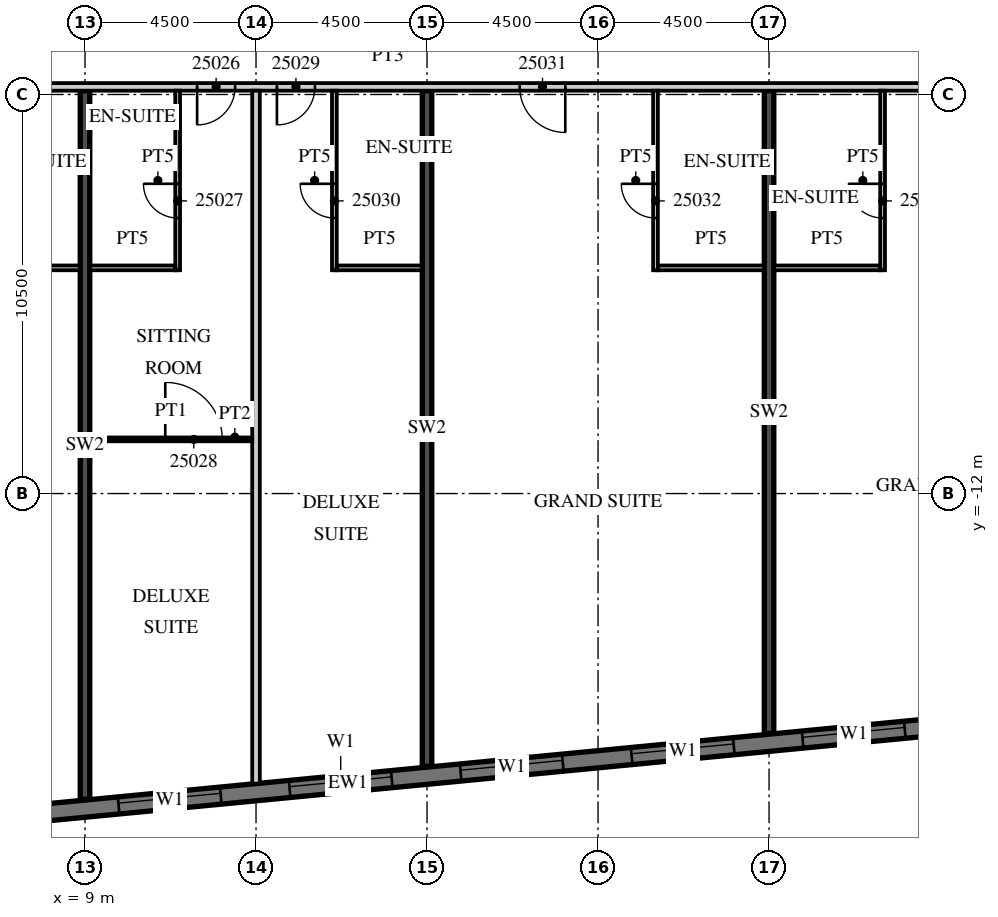
"""IFC4 building model, lengths in metres.
Left out: names, types, materials, properties, quantities, classifications, styles, units other than length and angle.
Written with IfcOpenShell. Run it as: python <this file> out.ifc"""

import sys

from ifc_helpers import new_model, si_unit, direction, frame, frame_2d, origin, place, context, subcontext, project, spatial, rectangle, extrude, element, fill, save


model = new_model("IFC4")
c1 = context("Model", 3, precision=1e-05, world=origin(), true_north=direction((0.0, 1.0)))
c2 = subcontext(c1, "Body", "Model", "MODEL_VIEW")
j1 = project(units=[si_unit("LENGTHUNIT", "METRE"), si_unit("PLANEANGLEUNIT", "RADIAN")], contexts=[c1])
p1 = place(None, origin())
s1 = spatial("IfcSite", under=j1, at=p1, CompositionType="ELEMENT")
p2 = place(p1, origin())
s2 = spatial("IfcBuilding", under=s1, at=p2, CompositionType="ELEMENT")
p3 = place(p2, frame((0.0, 0.0, 117.4)))
s3 = spatial("IfcBuildingStorey", under=s2, at=p3, CompositionType="ELEMENT", Elevation=117.4)
p4 = place(p3, frame((9.0, -20.044, 0.0), z_axis=(0.0, 0.0, 1.0), x_axis=(0.0, 1.0, 0.0)))
e1 = element("IfcWall", 1, at=p4, inside=s3, PredefinedType="SHEAR", context=c2, shape_type="SweptSolid", body=[
    extrude(rectangle(XDim=18.644, YDim=0.25, at=frame_2d((9.322, 0.0))), origin(), (0.0, 0.0, 1.0), 3.3),
])
p5 = place(p3, frame((18.0, -19.177, 0.0), z_axis=(0.0, 0.0, 1.0), x_axis=(0.0, 1.0, 0.0)))
e2 = element("IfcWall", 2, at=p5, inside=s3, PredefinedType="SHEAR", context=c2, shape_type="SweptSolid", body=[
    extrude(rectangle(XDim=17.777, YDim=0.25, at=frame_2d((8.889, 0.0))), origin(), (0.0, 0.0, 1.0), 3.3),
])
p6 = place(p3, frame((27.0, -18.311, 0.0), z_axis=(0.0, 0.0, 1.0), x_axis=(0.0, 1.0, 0.0)))
e3 = element("IfcWall", 3, at=p6, inside=s3, PredefinedType="SHEAR", context=c2, shape_type="SweptSolid", body=[
    extrude(rectangle(XDim=16.911, YDim=0.25, at=frame_2d((8.455, 0.0))), origin(), (0.0, 0.0, 1.0), 3.3),
])
p7 = place(p3, frame((-13.521, -22.46, 0.0), z_axis=(0.0, 0.0, 1.0), x_axis=(0.995396096335, 0.095846812164, 0.0)))
e4 = element("IfcWall", 4, at=p7, inside=s3, PredefinedType="SOLIDWALL", context=c2, shape_type="SweptSolid", body=[
    extrude(rectangle(XDim=59.151, YDim=0.45, at=frame_2d((29.575, 0.0))), origin(), (0.0, 0.0, 1.0), 3.02),
])
p8 = place(p7, frame((0.91, 0.0, 0.45)))
e5 = element("IfcOpeningElement", 5, at=p8, cuts=e4, PredefinedType="OPENING", context=c2, shape_type="SweptSolid", body=[
    extrude(rectangle(XDim=2.7, YDim=2.25, at=frame_2d((1.35, 1.125))), frame((0.0, 0.235, 0.0), z_axis=(0.0, -1.0, 0.0), x_axis=(1.0, 0.0, 0.0)), (0.0, 0.0, 1.0), 0.47),
])
p9 = place(p7, frame((5.431, 0.0, 0.45)))
e6 = element("IfcOpeningElement", 6, at=p9, cuts=e4, PredefinedType="OPENING", context=c2, shape_type="SweptSolid", body=[
    extrude(rectangle(XDim=2.7, YDim=2.25, at=frame_2d((1.35, 1.125))), frame((0.0, 0.235, 0.0), z_axis=(0.0, -1.0, 0.0), x_axis=(1.0, 0.0, 0.0)), (0.0, 0.0, 1.0), 0.47),
])
p10 = place(p7, frame((9.952, 0.0, 0.45)))
e7 = element("IfcOpeningElement", 7, at=p10, cuts=e4, PredefinedType="OPENING", context=c2, shape_type="SweptSolid", body=[
    extrude(rectangle(XDim=2.7, YDim=2.25, at=frame_2d((1.35, 1.125))), frame((0.0, 0.235, 0.0), z_axis=(0.0, -1.0, 0.0), x_axis=(1.0, 0.0, 0.0)), (0.0, 0.0, 1.0), 0.47),
])
p11 = place(p7, frame((14.473, 0.0, 0.45)))
e8 = element("IfcOpeningElement", 8, at=p11, cuts=e4, PredefinedType="OPENING", context=c2, shape_type="SweptSolid", body=[
    extrude(rectangle(XDim=2.7, YDim=2.25, at=frame_2d((1.35, 1.125))), frame((0.0, 0.235, 0.0), z_axis=(0.0, -1.0, 0.0), x_axis=(1.0, 0.0, 0.0)), (0.0, 0.0, 1.0), 0.47),
])
p12 = place(p7, frame((18.994, 0.0, 0.45)))
e9 = element("IfcOpeningElement", 9, at=p12, cuts=e4, PredefinedType="OPENING", context=c2, shape_type="SweptSolid", body=[
    extrude(rectangle(XDim=2.7, YDim=2.25, at=frame_2d((1.35, 1.125))), frame((0.0, 0.235, 0.0), z_axis=(0.0, -1.0, 0.0), x_axis=(1.0, 0.0, 0.0)), (0.0, 0.0, 1.0), 0.47),
])
p13 = place(p7, frame((23.514, 0.0, 0.45)))
e10 = element("IfcOpeningElement", 10, at=p13, cuts=e4, PredefinedType="OPENING", context=c2, shape_type="SweptSolid", body=[
    extrude(rectangle(XDim=2.7, YDim=2.25, at=frame_2d((1.35, 1.125))), frame((0.0, 0.235, 0.0), z_axis=(0.0, -1.0, 0.0), x_axis=(1.0, 0.0, 0.0)), (0.0, 0.0, 1.0), 0.47),
])
p14 = place(p7, frame((28.035, 0.0, 0.45)))
e11 = element("IfcOpeningElement", 11, at=p14, cuts=e4, PredefinedType="OPENING", context=c2, shape_type="SweptSolid", body=[
    extrude(rectangle(XDim=2.7, YDim=2.25, at=frame_2d((1.35, 1.125))), frame((0.0, 0.235, 0.0), z_axis=(0.0, -1.0, 0.0), x_axis=(1.0, 0.0, 0.0)), (0.0, 0.0, 1.0), 0.47),
])
p15 = place(p7, frame((32.556, 0.0, 0.45)))
e12 = element("IfcOpeningElement", 12, at=p15, cuts=e4, PredefinedType="OPENING", context=c2, shape_type="SweptSolid", body=[
    extrude(rectangle(XDim=2.7, YDim=2.25, at=frame_2d((1.35, 1.125))), frame((0.0, 0.235, 0.0), z_axis=(0.0, -1.0, 0.0), x_axis=(1.0, 0.0, 0.0)), (0.0, 0.0, 1.0), 0.47),
])
p16 = place(p7, frame((37.077, 0.0, 0.45)))
e13 = element("IfcOpeningElement", 13, at=p16, cuts=e4, PredefinedType="OPENING", context=c2, shape_type="SweptSolid", body=[
    extrude(rectangle(XDim=2.7, YDim=2.25, at=frame_2d((1.35, 1.125))), frame((0.0, 0.235, 0.0), z_axis=(0.0, -1.0, 0.0), x_axis=(1.0, 0.0, 0.0)), (0.0, 0.0, 1.0), 0.47),
])
p17 = place(p7, frame((41.598, 0.0, 0.45)))
e14 = element("IfcOpeningElement", 14, at=p17, cuts=e4, PredefinedType="OPENING", context=c2, shape_type="SweptSolid", body=[
    extrude(rectangle(XDim=2.7, YDim=2.25, at=frame_2d((1.35, 1.125))), frame((0.0, 0.235, 0.0), z_axis=(0.0, -1.0, 0.0), x_axis=(1.0, 0.0, 0.0)), (0.0, 0.0, 1.0), 0.47),
])
p18 = place(p7, frame((46.118, 0.0, 0.45)))
e15 = element("IfcOpeningElement", 15, at=p18, cuts=e4, PredefinedType="OPENING", context=c2, shape_type="SweptSolid", body=[
    extrude(rectangle(XDim=2.7, YDim=2.25, at=frame_2d((1.35, 1.125))), frame((0.0, 0.235, 0.0), z_axis=(0.0, -1.0, 0.0), x_axis=(1.0, 0.0, 0.0)), (0.0, 0.0, 1.0), 0.47),
])
p19 = place(p7, frame((50.639, 0.0, 0.45)))
e16 = element("IfcOpeningElement", 16, at=p19, cuts=e4, PredefinedType="OPENING", context=c2, shape_type="SweptSolid", body=[
    extrude(rectangle(XDim=2.7, YDim=2.25, at=frame_2d((1.35, 1.125))), frame((0.0, 0.235, 0.0), z_axis=(0.0, -1.0, 0.0), x_axis=(1.0, 0.0, 0.0)), (0.0, 0.0, 1.0), 0.47),
])
p20 = place(p7, frame((55.15, 0.0, 0.45)))
e17 = element("IfcOpeningElement", 17, at=p20, cuts=e4, PredefinedType="OPENING", context=c2, shape_type="SweptSolid", body=[
    extrude(rectangle(XDim=2.7, YDim=2.25, at=frame_2d((1.35, 1.125))), frame((0.0, 0.235, 0.0), z_axis=(0.0, -1.0, 0.0), x_axis=(1.0, 0.0, 0.0)), (0.0, 0.0, 1.0), 0.47),
])
p21 = place(p3, frame((-13.5, -1.3, 0.0), z_axis=(0.0, 0.0, 1.0), x_axis=(1.0, 0.0, 0.0)))
e18 = element("IfcWall", 18, at=p21, inside=s3, PredefinedType="PARTITIONING", context=c2, shape_type="SweptSolid", body=[
    extrude(rectangle(XDim=60.932, YDim=0.2, at=frame_2d((30.466, 0.0))), origin(), (0.0, 0.0, 1.0), 3.02),
])
p22 = place(p21, frame((0.575, 0.0, 0.0)))
e19 = element("IfcOpeningElement", 19, at=p22, cuts=e18, PredefinedType="OPENING", context=c2, shape_type="SweptSolid", body=[
    extrude(rectangle(XDim=1.0, YDim=2.1, at=frame_2d((0.5, 1.05))), frame((0.0, 0.11, 0.0), z_axis=(0.0, -1.0, 0.0), x_axis=(1.0, 0.0, 0.0)), (0.0, 0.0, 1.0), 0.22),
])
p23 = place(p21, frame((5.075, 0.0, 0.0)))
e20 = element("IfcOpeningElement", 20, at=p23, cuts=e18, PredefinedType="OPENING", context=c2, shape_type="SweptSolid", body=[
    extrude(rectangle(XDim=1.0, YDim=2.1, at=frame_2d((0.5, 1.05))), frame((0.0, 0.11, 0.0), z_axis=(0.0, -1.0, 0.0), x_axis=(1.0, 0.0, 0.0)), (0.0, 0.0, 1.0), 0.22),
])
p24 = place(p21, frame((11.925, 0.0, 0.0)))
e21 = element("IfcOpeningElement", 21, at=p24, cuts=e18, PredefinedType="OPENING", context=c2, shape_type="SweptSolid", body=[
    extrude(rectangle(XDim=1.0, YDim=2.1, at=frame_2d((0.5, 1.05))), frame((0.0, 0.11, 0.0), z_axis=(0.0, -1.0, 0.0), x_axis=(1.0, 0.0, 0.0)), (0.0, 0.0, 1.0), 0.22),
])
p25 = place(p21, frame((15.938, 0.0, 0.0)))
e22 = element("IfcOpeningElement", 22, at=p25, cuts=e18, PredefinedType="OPENING", context=c2, shape_type="SweptSolid", body=[
    extrude(rectangle(XDim=1.2, YDim=2.1, at=frame_2d((0.6, 1.05))), frame((0.0, 0.11, 0.0), z_axis=(0.0, -1.0, 0.0), x_axis=(1.0, 0.0, 0.0)), (0.0, 0.0, 1.0), 0.22),
])
p26 = place(p21, frame((25.45, 0.0, 0.0)))
e23 = element("IfcOpeningElement", 23, at=p26, cuts=e18, PredefinedType="OPENING", context=c2, shape_type="SweptSolid", body=[
    extrude(rectangle(XDim=1.0, YDim=2.1, at=frame_2d((0.5, 1.05))), frame((0.0, 0.11, 0.0), z_axis=(0.0, -1.0, 0.0), x_axis=(1.0, 0.0, 0.0)), (0.0, 0.0, 1.0), 0.22),
])
p27 = place(p21, frame((27.55, 0.0, 0.0)))
e24 = element("IfcOpeningElement", 24, at=p27, cuts=e18, PredefinedType="OPENING", context=c2, shape_type="SweptSolid", body=[
    extrude(rectangle(XDim=1.0, YDim=2.1, at=frame_2d((0.5, 1.05))), frame((0.0, 0.11, 0.0), z_axis=(0.0, -1.0, 0.0), x_axis=(1.0, 0.0, 0.0)), (0.0, 0.0, 1.0), 0.22),
])
p28 = place(p21, frame((33.938, 0.0, 0.0)))
e25 = element("IfcOpeningElement", 25, at=p28, cuts=e18, PredefinedType="OPENING", context=c2, shape_type="SweptSolid", body=[
    extrude(rectangle(XDim=1.2, YDim=2.1, at=frame_2d((0.6, 1.05))), frame((0.0, 0.11, 0.0), z_axis=(0.0, -1.0, 0.0), x_axis=(1.0, 0.0, 0.0)), (0.0, 0.0, 1.0), 0.22),
])
p29 = place(p21, frame((45.862, 0.0, 0.0)))
e26 = element("IfcOpeningElement", 26, at=p29, cuts=e18, PredefinedType="OPENING", context=c2, shape_type="SweptSolid", body=[
    extrude(rectangle(XDim=1.2, YDim=2.1, at=frame_2d((0.6, 1.05))), frame((0.0, 0.11, 0.0), z_axis=(0.0, -1.0, 0.0), x_axis=(1.0, 0.0, 0.0)), (0.0, 0.0, 1.0), 0.22),
])
p30 = place(p21, frame((52.425, 0.0, 0.0)))
e27 = element("IfcOpeningElement", 27, at=p30, cuts=e18, PredefinedType="OPENING", context=c2, shape_type="SweptSolid", body=[
    extrude(rectangle(XDim=1.0, YDim=2.1, at=frame_2d((0.5, 1.05))), frame((0.0, 0.11, 0.0), z_axis=(0.0, -1.0, 0.0), x_axis=(1.0, 0.0, 0.0)), (0.0, 0.0, 1.0), 0.22),
])
p31 = place(p21, frame((56.95, 0.0, 0.0)))
e28 = element("IfcOpeningElement", 28, at=p31, cuts=e18, PredefinedType="OPENING", context=c2, shape_type="SweptSolid", body=[
    extrude(rectangle(XDim=1.0, YDim=2.1, at=frame_2d((0.5, 1.05))), frame((0.0, 0.11, 0.0), z_axis=(0.0, -1.0, 0.0), x_axis=(1.0, 0.0, 0.0)), (0.0, 0.0, 1.0), 0.22),
])
p32 = place(p21, frame((59.882, 0.0, 0.0)))
e29 = element("IfcOpeningElement", 29, at=p32, cuts=e18, PredefinedType="OPENING", context=c2, shape_type="SweptSolid", body=[
    extrude(rectangle(XDim=0.9, YDim=2.1, at=frame_2d((0.45, 1.05))), frame((0.0, 0.11, 0.0), z_axis=(0.0, -1.0, 0.0), x_axis=(1.0, 0.0, 0.0)), (0.0, 0.0, 1.0), 0.22),
])
p33 = place(p3, frame((6.075, -6.062, 0.0), z_axis=(0.0, 0.0, 1.0), x_axis=(1.0, 0.0, 0.0)))
e30 = element("IfcWall", 30, at=p33, inside=s3, PredefinedType="PARTITIONING", context=c2, shape_type="SweptSolid", body=[
    extrude(rectangle(XDim=2.8, YDim=0.125, at=frame_2d((1.4, 0.0))), origin(), (0.0, 0.0, 1.0), 3.02),
])
p34 = place(p3, frame((13.5, -19.633, 0.0), z_axis=(0.0, 0.0, 1.0), x_axis=(0.0, 1.0, 0.0)))
e31 = element("IfcWall", 31, at=p34, inside=s3, PredefinedType="PARTITIONING", context=c2, shape_type="SweptSolid", body=[
    extrude(rectangle(XDim=18.233, YDim=0.2, at=frame_2d((9.117, 0.0))), origin(), (0.0, 0.0, 1.0), 3.02),
])
p35 = place(p3, frame((11.438, -6.125, 0.0), z_axis=(0.0, 0.0, 1.0), x_axis=(0.0, 1.0, 0.0)))
e32 = element("IfcWall", 32, at=p35, inside=s3, PredefinedType="PARTITIONING", context=c2, shape_type="SweptSolid", body=[
    extrude(rectangle(XDim=4.725, YDim=0.125, at=frame_2d((2.363, 0.0))), origin(), (0.0, 0.0, 1.0), 3.02),
])
p36 = place(p35, frame((1.375, 0.0, 0.0)))
e33 = element("IfcOpeningElement", 33, at=p36, cuts=e32, PredefinedType="OPENING", context=c2, shape_type="SweptSolid", body=[
    extrude(rectangle(XDim=0.9, YDim=2.1, at=frame_2d((0.45, 1.05))), frame((0.0, 0.073, 0.0), z_axis=(0.0, -1.0, 0.0), x_axis=(1.0, 0.0, 0.0)), (0.0, 0.0, 1.0), 0.145),
])
p37 = place(p3, frame((9.125, -6.062, 0.0), z_axis=(0.0, 0.0, 1.0), x_axis=(1.0, 0.0, 0.0)))
e34 = element("IfcWall", 34, at=p37, inside=s3, PredefinedType="PARTITIONING", context=c2, shape_type="SweptSolid", body=[
    extrude(rectangle(XDim=2.25, YDim=0.125, at=frame_2d((1.125, 0.0))), origin(), (0.0, 0.0, 1.0), 3.02),
])
p38 = place(p3, frame((9.125, -10.575, 0.0), z_axis=(0.0, 0.0, 1.0), x_axis=(1.0, 0.0, 0.0)))
e35 = element("IfcWall", 35, at=p38, inside=s3, PredefinedType="PARTITIONING", context=c2, shape_type="SweptSolid", body=[
    extrude(rectangle(XDim=4.275, YDim=0.1, at=frame_2d((2.137, 0.0))), origin(), (0.0, 0.0, 1.0), 3.02),
])
p39 = place(p38, frame((1.987, 0.0, 0.0)))
e36 = element("IfcOpeningElement", 36, at=p39, cuts=e35, PredefinedType="OPENING", context=c2, shape_type="SweptSolid", body=[
    extrude(rectangle(XDim=1.5, YDim=2.1, at=frame_2d((0.75, 1.05))), frame((0.0, 0.06, 0.0), z_axis=(0.0, -1.0, 0.0), x_axis=(1.0, 0.0, 0.0)), (0.0, 0.0, 1.0), 0.12),
])
p40 = place(p3, frame((15.562, -6.125, 0.0), z_axis=(0.0, 0.0, 1.0), x_axis=(0.0, 1.0, 0.0)))
e37 = element("IfcWall", 37, at=p40, inside=s3, PredefinedType="PARTITIONING", context=c2, shape_type="SweptSolid", body=[
    extrude(rectangle(XDim=4.725, YDim=0.125, at=frame_2d((2.363, 0.0))), origin(), (0.0, 0.0, 1.0), 3.02),
])
p41 = place(p40, frame((1.375, 0.0, 0.0)))
e38 = element("IfcOpeningElement", 38, at=p41, cuts=e37, PredefinedType="OPENING", context=c2, shape_type="SweptSolid", body=[
    extrude(rectangle(XDim=0.9, YDim=2.1, at=frame_2d((0.45, 1.05))), frame((0.0, 0.073, 0.0), z_axis=(0.0, -1.0, 0.0), x_axis=(1.0, 0.0, 0.0)), (0.0, 0.0, 1.0), 0.145),
])
p42 = place(p3, frame((15.625, -6.062, 0.0), z_axis=(0.0, 0.0, 1.0), x_axis=(1.0, 0.0, 0.0)))
e39 = element("IfcWall", 39, at=p42, inside=s3, PredefinedType="PARTITIONING", context=c2, shape_type="SweptSolid", body=[
    extrude(rectangle(XDim=2.25, YDim=0.125, at=frame_2d((1.125, 0.0))), origin(), (0.0, 0.0, 1.0), 3.02),
])
p43 = place(p3, frame((24.012, -6.125, 0.0), z_axis=(0.0, 0.0, 1.0), x_axis=(0.0, 1.0, 0.0)))
e40 = element("IfcWall", 40, at=p43, inside=s3, PredefinedType="PARTITIONING", context=c2, shape_type="SweptSolid", body=[
    extrude(rectangle(XDim=4.725, YDim=0.125, at=frame_2d((2.363, 0.0))), origin(), (0.0, 0.0, 1.0), 3.02),
])
p44 = place(p43, frame((1.375, 0.0, 0.0)))
e41 = element("IfcOpeningElement", 41, at=p44, cuts=e40, PredefinedType="OPENING", context=c2, shape_type="SweptSolid", body=[
    extrude(rectangle(XDim=0.9, YDim=2.1, at=frame_2d((0.45, 1.05))), frame((0.0, 0.073, 0.0), z_axis=(0.0, -1.0, 0.0), x_axis=(1.0, 0.0, 0.0)), (0.0, 0.0, 1.0), 0.145),
])
p45 = place(p3, frame((24.075, -6.062, 0.0), z_axis=(0.0, 0.0, 1.0), x_axis=(1.0, 0.0, 0.0)))
e42 = element("IfcWall", 42, at=p45, inside=s3, PredefinedType="PARTITIONING", context=c2, shape_type="SweptSolid", body=[
    extrude(rectangle(XDim=2.8, YDim=0.125, at=frame_2d((1.4, 0.0))), origin(), (0.0, 0.0, 1.0), 3.02),
])
p46 = place(p3, frame((29.988, -6.125, 0.0), z_axis=(0.0, 0.0, 1.0), x_axis=(0.0, 1.0, 0.0)))
e43 = element("IfcWall", 43, at=p46, inside=s3, PredefinedType="PARTITIONING", context=c2, shape_type="SweptSolid", body=[
    extrude(rectangle(XDim=4.725, YDim=0.125, at=frame_2d((2.363, 0.0))), origin(), (0.0, 0.0, 1.0), 3.02),
])
p47 = place(p46, frame((1.375, 0.0, 0.0)))
e44 = element("IfcOpeningElement", 44, at=p47, cuts=e43, PredefinedType="OPENING", context=c2, shape_type="SweptSolid", body=[
    extrude(rectangle(XDim=0.9, YDim=2.1, at=frame_2d((0.45, 1.05))), frame((0.0, 0.073, 0.0), z_axis=(0.0, -1.0, 0.0), x_axis=(1.0, 0.0, 0.0)), (0.0, 0.0, 1.0), 0.145),
])
p48 = place(p3, frame((27.125, -6.062, 0.0), z_axis=(0.0, 0.0, 1.0), x_axis=(1.0, 0.0, 0.0)))
e45 = element("IfcWall", 45, at=p48, inside=s3, PredefinedType="PARTITIONING", context=c2, shape_type="SweptSolid", body=[
    extrude(rectangle(XDim=2.8, YDim=0.125, at=frame_2d((1.4, 0.0))), origin(), (0.0, 0.0, 1.0), 3.02),
])
p49 = place(p13, origin())
e46 = element("IfcWindow", 46, at=p49, inside=s3, PartitioningType="SINGLE_PANEL", PredefinedType="WINDOW", context=c2, shape_type="SweptSolid", body=[
    extrude(rectangle(XDim=2.7, YDim=2.25, at=frame_2d((1.35, 1.125))), frame((0.0, 0.09, 0.0), z_axis=(0.0, -1.0, 0.0), x_axis=(1.0, 0.0, 0.0)), (0.0, 0.0, 1.0), 0.06),
])
fill(e10, e46)
p50 = place(p14, origin())
e47 = element("IfcWindow", 47, at=p50, inside=s3, PartitioningType="SINGLE_PANEL", PredefinedType="WINDOW", context=c2, shape_type="SweptSolid", body=[
    extrude(rectangle(XDim=2.7, YDim=2.25, at=frame_2d((1.35, 1.125))), frame((0.0, 0.09, 0.0), z_axis=(0.0, -1.0, 0.0), x_axis=(1.0, 0.0, 0.0)), (0.0, 0.0, 1.0), 0.06),
])
fill(e11, e47)
p51 = place(p15, origin())
e48 = element("IfcWindow", 48, at=p51, inside=s3, PartitioningType="SINGLE_PANEL", PredefinedType="WINDOW", context=c2, shape_type="SweptSolid", body=[
    extrude(rectangle(XDim=2.7, YDim=2.25, at=frame_2d((1.35, 1.125))), frame((0.0, 0.09, 0.0), z_axis=(0.0, -1.0, 0.0), x_axis=(1.0, 0.0, 0.0)), (0.0, 0.0, 1.0), 0.06),
])
fill(e12, e48)
p52 = place(p16, origin())
e49 = element("IfcWindow", 49, at=p52, inside=s3, PartitioningType="SINGLE_PANEL", PredefinedType="WINDOW", context=c2, shape_type="SweptSolid", body=[
    extrude(rectangle(XDim=2.7, YDim=2.25, at=frame_2d((1.35, 1.125))), frame((0.0, 0.09, 0.0), z_axis=(0.0, -1.0, 0.0), x_axis=(1.0, 0.0, 0.0)), (0.0, 0.0, 1.0), 0.06),
])
fill(e13, e49)
p53 = place(p17, origin())
e50 = element("IfcWindow", 50, at=p53, inside=s3, PartitioningType="SINGLE_PANEL", PredefinedType="WINDOW", context=c2, shape_type="SweptSolid", body=[
    extrude(rectangle(XDim=2.7, YDim=2.25, at=frame_2d((1.35, 1.125))), frame((0.0, 0.09, 0.0), z_axis=(0.0, -1.0, 0.0), x_axis=(1.0, 0.0, 0.0)), (0.0, 0.0, 1.0), 0.06),
])
fill(e14, e50)
p54 = place(p26, origin())
e51 = element("IfcDoor", 51, at=p54, inside=s3, OperationType="SINGLE_SWING_LEFT", PredefinedType="DOOR", context=c2, shape_type="SweptSolid", body=[
    extrude(rectangle(XDim=1.0, YDim=2.1, at=frame_2d((0.5, 1.05))), frame((0.0, 0.025, 0.0), z_axis=(0.0, -1.0, 0.0), x_axis=(1.0, 0.0, 0.0)), (0.0, 0.0, 1.0), 0.05),
])
fill(e23, e51)
p55 = place(p36, origin())
e52 = element("IfcDoor", 52, at=p55, inside=s3, OperationType="SINGLE_SWING_RIGHT", PredefinedType="DOOR", context=c2, shape_type="SweptSolid", body=[
    extrude(rectangle(XDim=0.9, YDim=2.1, at=frame_2d((0.45, 1.05))), frame((0.0, 0.025, 0.0), z_axis=(0.0, -1.0, 0.0), x_axis=(1.0, 0.0, 0.0)), (0.0, 0.0, 1.0), 0.05),
])
fill(e33, e52)
p56 = place(p39, origin())
e53 = element("IfcDoor", 53, at=p56, inside=s3, OperationType="SINGLE_SWING_LEFT", PredefinedType="DOOR", context=c2, shape_type="SweptSolid", body=[
    extrude(rectangle(XDim=1.5, YDim=2.1, at=frame_2d((0.75, 1.05))), frame((0.0, 0.025, 0.0), z_axis=(0.0, -1.0, 0.0), x_axis=(1.0, 0.0, 0.0)), (0.0, 0.0, 1.0), 0.05),
])
fill(e36, e53)
p57 = place(p27, origin())
e54 = element("IfcDoor", 54, at=p57, inside=s3, OperationType="SINGLE_SWING_LEFT", PredefinedType="DOOR", context=c2, shape_type="SweptSolid", body=[
    extrude(rectangle(XDim=1.0, YDim=2.1, at=frame_2d((0.5, 1.05))), frame((0.0, 0.025, 0.0), z_axis=(0.0, -1.0, 0.0), x_axis=(1.0, 0.0, 0.0)), (0.0, 0.0, 1.0), 0.05),
])
fill(e24, e54)
p58 = place(p41, origin())
e55 = element("IfcDoor", 55, at=p58, inside=s3, OperationType="SINGLE_SWING_RIGHT", PredefinedType="DOOR", context=c2, shape_type="SweptSolid", body=[
    extrude(rectangle(XDim=0.9, YDim=2.1, at=frame_2d((0.45, 1.05))), frame((0.0, 0.025, 0.0), z_axis=(0.0, -1.0, 0.0), x_axis=(1.0, 0.0, 0.0)), (0.0, 0.0, 1.0), 0.05),
])
fill(e38, e55)
p59 = place(p28, origin())
e56 = element("IfcDoor", 56, at=p59, inside=s3, OperationType="SINGLE_SWING_RIGHT", PredefinedType="DOOR", context=c2, shape_type="SweptSolid", body=[
    extrude(rectangle(XDim=1.2, YDim=2.1, at=frame_2d((0.6, 1.05))), frame((0.0, 0.025, 0.0), z_axis=(0.0, -1.0, 0.0), x_axis=(1.0, 0.0, 0.0)), (0.0, 0.0, 1.0), 0.05),
])
fill(e25, e56)
p60 = place(p44, origin())
e57 = element("IfcDoor", 57, at=p60, inside=s3, OperationType="SINGLE_SWING_RIGHT", PredefinedType="DOOR", context=c2, shape_type="SweptSolid", body=[
    extrude(rectangle(XDim=0.9, YDim=2.1, at=frame_2d((0.45, 1.05))), frame((0.0, 0.025, 0.0), z_axis=(0.0, -1.0, 0.0), x_axis=(1.0, 0.0, 0.0)), (0.0, 0.0, 1.0), 0.05),
])
fill(e41, e57)
p61 = place(p47, origin())
e58 = element("IfcDoor", 58, at=p61, inside=s3, OperationType="SINGLE_SWING_RIGHT", PredefinedType="DOOR", context=c2, shape_type="SweptSolid", body=[
    extrude(rectangle(XDim=0.9, YDim=2.1, at=frame_2d((0.45, 1.05))), frame((0.0, 0.025, 0.0), z_axis=(0.0, -1.0, 0.0), x_axis=(1.0, 0.0, 0.0)), (0.0, 0.0, 1.0), 0.05),
])
fill(e44, e58)
save(model, sys.argv[1])
